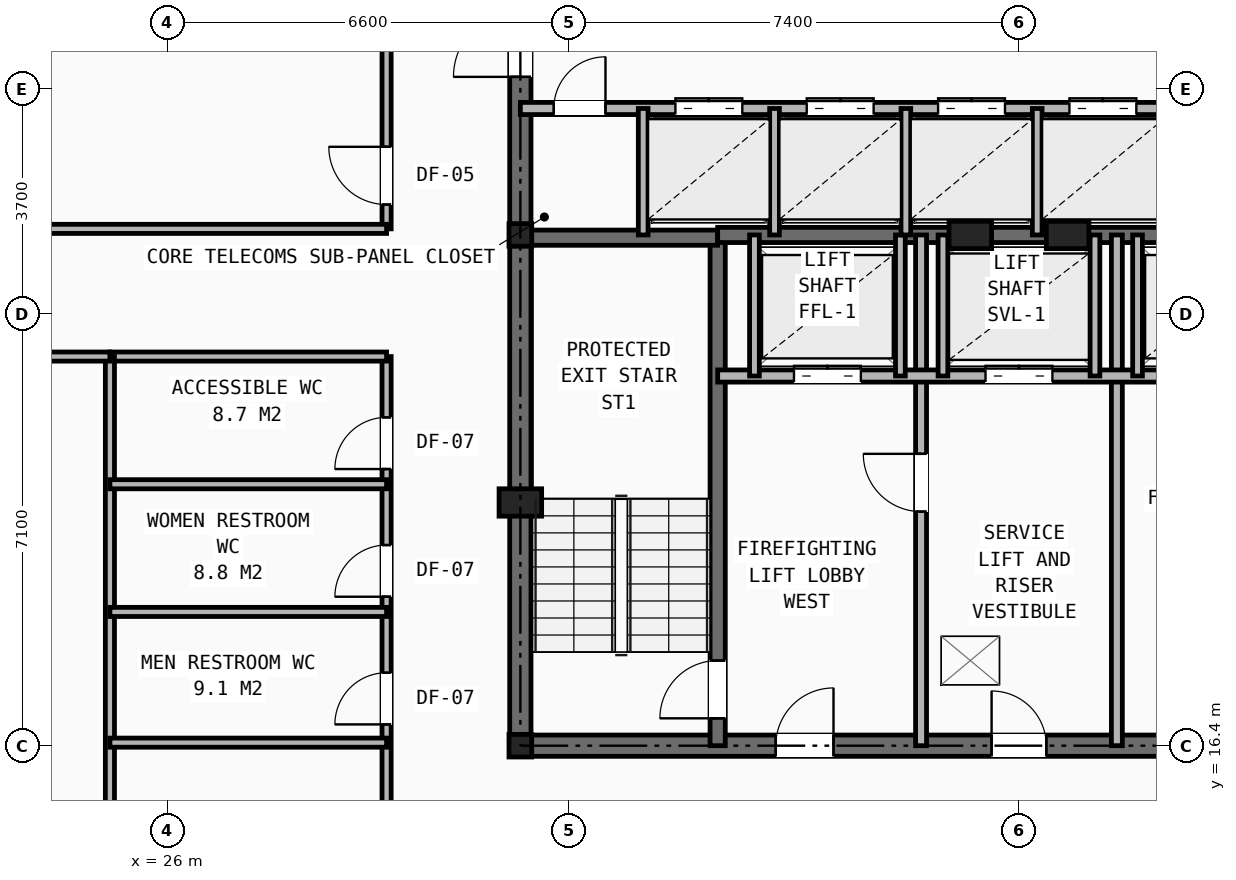
"""IFC4 building model, lengths in metres.
Left out: names, types, materials, properties, quantities, classifications, styles, units other than length and angle.
Written with IfcOpenShell. Run it as: python <this file> out.ifc"""

import sys

from ifc_helpers import new_model, si_unit, direction, frame, frame_2d, origin, origin_2d, place, context, subcontext, project, spatial, rectangle, i_section, extrude, element, fill, save


model = new_model("IFC4")
c1 = context("Model", 3, precision=1e-05, world=origin(), true_north=direction((0.0, 1.0)))
c2 = subcontext(c1, "Body", "Model", "MODEL_VIEW")
j1 = project(units=[si_unit("LENGTHUNIT", "METRE"), si_unit("PLANEANGLEUNIT", "RADIAN")], contexts=[c1])
p1 = place(None, origin())
s1 = spatial("IfcSite", under=j1, at=p1, CompositionType="ELEMENT")
p2 = place(p1, origin())
s2 = spatial("IfcBuilding", under=s1, at=p2, CompositionType="ELEMENT")
p3 = place(p2, frame((0.0, 0.0, 140.15)))
s3 = spatial("IfcBuildingStorey", under=s2, at=p3, CompositionType="ELEMENT", Elevation=140.15)
for number, where, z_axis, x_axis in (
    (1, (31.8, 16.4, 0.0), (0.0, 0.0, 1.0), (1.0, 0.0, 0.0)),
    (2, (31.8, 24.8, 0.0), (0.0, 0.0, 1.0), (1.0, 0.0, 0.0)),
):
    element("IfcColumn", number, at=place(p3, frame(where, z_axis=z_axis, x_axis=x_axis)), inside=s3, PredefinedType="COLUMN", context=c2, shape_type="SweptSolid", body=[
        extrude(i_section(OverallWidth=0.374, OverallDepth=0.372, WebThickness=0.016, FlangeThickness=0.026, at=origin_2d()), origin(), (0.0, 0.0, 1.0), 3.45),
    ])
for number, where, z_axis, x_axis in (
    (3, (31.8, 20.4, 0.0), (0.0, 0.0, 1.0), (1.0, 0.0, 0.0)),
    (4, (39.2, 24.8, 0.0), (0.0, 0.0, 1.0), (1.0, 0.0, 0.0)),
    (5, (40.8, 24.8, 0.0), (0.0, 0.0, 1.0), (1.0, 0.0, 0.0)),
):
    element("IfcColumn", number, at=place(p3, frame(where, z_axis=z_axis, x_axis=x_axis)), inside=s3, PredefinedType="PILASTER", context=c2, shape_type="SweptSolid", body=[
        extrude(rectangle(XDim=0.7, YDim=0.45, at=origin_2d()), origin(), (0.0, 0.0, 1.0), 3.45),
    ])
p4 = place(p3, frame((31.8, 16.4, 0.0), z_axis=(0.0, 0.0, 1.0), x_axis=(1.0, 0.0, 0.0)))
e6 = element("IfcWall", 6, at=p4, inside=s3, PredefinedType="SHEAR", context=c2, shape_type="SweptSolid", body=[
    extrude(rectangle(XDim=16.4, YDim=0.35, at=frame_2d((8.2, 0.0))), origin(), (0.0, 0.0, 1.0), 3.21),
])
p5 = place(p4, frame((7.75, 0.0, 0.0)))
e7 = element("IfcOpeningElement", 7, at=p5, cuts=e6, PredefinedType="OPENING", context=c2, shape_type="SweptSolid", body=[
    extrude(rectangle(XDim=0.9, YDim=2.1, at=frame_2d((0.45, 1.05))), frame((0.0, 0.185, 0.0), z_axis=(0.0, -1.0, 0.0), x_axis=(1.0, 0.0, 0.0)), (0.0, 0.0, 1.0), 0.37),
])
p6 = place(p4, frame((4.2, 0.0, 0.0)))
e8 = element("IfcOpeningElement", 8, at=p6, cuts=e6, PredefinedType="OPENING", context=c2, shape_type="SweptSolid", body=[
    extrude(rectangle(XDim=0.95, YDim=2.1, at=frame_2d((0.475, 1.05))), frame((0.0, 0.185, 0.0), z_axis=(0.0, -1.0, 0.0), x_axis=(1.0, 0.0, 0.0)), (0.0, 0.0, 1.0), 0.37),
])
p7 = place(p4, frame((10.6, 0.0, 0.0)))
e9 = element("IfcOpeningElement", 9, at=p7, cuts=e6, PredefinedType="OPENING", context=c2, shape_type="SweptSolid", body=[
    extrude(rectangle(XDim=0.95, YDim=2.1, at=frame_2d((0.475, 1.05))), frame((0.0, 0.185, 0.0), z_axis=(0.0, -1.0, 0.0), x_axis=(1.0, 0.0, 0.0)), (0.0, 0.0, 1.0), 0.37),
])
p8 = place(p3, frame((31.8, 16.4, 0.0), z_axis=(0.0, 0.0, 1.0), x_axis=(0.0, 1.0, 0.0)))
e10 = element("IfcWall", 10, at=p8, inside=s3, PredefinedType="SHEAR", context=c2, shape_type="SweptSolid", body=[
    extrude(rectangle(XDim=14.8, YDim=0.35, at=frame_2d((7.4, 0.0))), origin(), (0.0, 0.0, 1.0), 3.21),
])
p9 = place(p8, frame((11.0, 0.0, 0.0)))
e11 = element("IfcOpeningElement", 11, at=p9, cuts=e10, PredefinedType="OPENING", context=c2, shape_type="SweptSolid", body=[
    extrude(rectangle(XDim=1.1, YDim=2.15, at=frame_2d((0.55, 1.075))), frame((0.0, 0.185, 0.0), z_axis=(0.0, -1.0, 0.0), x_axis=(1.0, 0.0, 0.0)), (0.0, 0.0, 1.0), 0.37),
])
p10 = place(p3, frame((35.045, 16.4, 0.0), z_axis=(0.0, 0.0, 1.0), x_axis=(0.0, 1.0, 0.0)))
e12 = element("IfcWall", 12, at=p10, inside=s3, PredefinedType="SHEAR", context=c2, shape_type="SweptSolid", body=[
    extrude(rectangle(XDim=8.4, YDim=0.25, at=frame_2d((4.2, 0.0))), origin(), (0.0, 0.0, 1.0), 3.21),
])
p11 = place(p10, frame((0.45, 0.0, 0.0)))
e13 = element("IfcOpeningElement", 13, at=p11, cuts=e12, PredefinedType="OPENING", context=c2, shape_type="SweptSolid", body=[
    extrude(rectangle(XDim=0.95, YDim=2.1, at=frame_2d((0.475, 1.05))), frame((0.0, 0.135, 0.0), z_axis=(0.0, -1.0, 0.0), x_axis=(1.0, 0.0, 0.0)), (0.0, 0.0, 1.0), 0.27),
])
p12 = place(p3, frame((31.8, 24.755, 0.0), z_axis=(0.0, 0.0, 1.0), x_axis=(1.0, 0.0, 0.0)))
e14 = element("IfcWall", 14, at=p12, inside=s3, PredefinedType="SHEAR", context=c2, shape_type="SweptSolid", body=[
    extrude(rectangle(XDim=3.245, YDim=0.25, at=frame_2d((1.623, 0.0))), origin(), (0.0, 0.0, 1.0), 3.21),
])
p13 = place(p3, frame((35.045, 24.8, 0.0), z_axis=(0.0, 0.0, 1.0), x_axis=(1.0, 0.0, 0.0)))
e15 = element("IfcWall", 15, at=p13, inside=s3, PredefinedType="SHEAR", context=c2, shape_type="SweptSolid", body=[
    extrude(rectangle(XDim=9.91, YDim=0.25, at=frame_2d((4.955, 0.0))), origin(), (0.0, 0.0, 1.0), 3.21),
])
p14 = place(p3, frame((38.39, 16.4, 0.0), z_axis=(0.0, 0.0, 1.0), x_axis=(0.0, 1.0, 0.0)))
e16 = element("IfcWall", 16, at=p14, inside=s3, PredefinedType="PARTITIONING", context=c2, shape_type="SweptSolid", body=[
    extrude(rectangle(XDim=8.4, YDim=0.18, at=frame_2d((4.2, 0.0))), origin(), (0.0, 0.0, 1.0), 2.938),
])
p15 = place(p14, frame((3.85, 0.0, 0.0)))
e17 = element("IfcOpeningElement", 17, at=p15, cuts=e16, PredefinedType="OPENING", context=c2, shape_type="SweptSolid", body=[
    extrude(rectangle(XDim=0.95, YDim=2.1, at=frame_2d((0.475, 1.05))), frame((0.0, 0.1, 0.0), z_axis=(0.0, -1.0, 0.0), x_axis=(1.0, 0.0, 0.0)), (0.0, 0.0, 1.0), 0.2),
])
p16 = place(p3, frame((41.61, 16.4, 0.0), z_axis=(0.0, 0.0, 1.0), x_axis=(0.0, 1.0, 0.0)))
e18 = element("IfcWall", 18, at=p16, inside=s3, PredefinedType="PARTITIONING", context=c2, shape_type="SweptSolid", body=[
    extrude(rectangle(XDim=8.4, YDim=0.18, at=frame_2d((4.2, 0.0))), origin(), (0.0, 0.0, 1.0), 2.938),
])
p17 = place(p3, frame((35.045, 22.48, 0.0), z_axis=(0.0, 0.0, 1.0), x_axis=(1.0, 0.0, 0.0)))
e19 = element("IfcWall", 19, at=p17, inside=s3, PredefinedType="SOLIDWALL", context=c2, shape_type="SweptSolid", body=[
    extrude(rectangle(XDim=9.91, YDim=0.2, at=frame_2d((4.955, 0.0))), origin(), (0.0, 0.0, 1.0), 3.21),
])
p18 = place(p17, frame((1.255, 0.0, 0.0)))
e20 = element("IfcOpeningElement", 20, at=p18, cuts=e19, PredefinedType="OPENING", context=c2, shape_type="SweptSolid", body=[
    extrude(rectangle(XDim=1.1, YDim=2.15, at=frame_2d((0.55, 1.075))), frame((0.0, 0.11, 0.0), z_axis=(0.0, -1.0, 0.0), x_axis=(1.0, 0.0, 0.0)), (0.0, 0.0, 1.0), 0.22),
])
p19 = place(p17, frame((7.555, 0.0, 0.0)))
e21 = element("IfcOpeningElement", 21, at=p19, cuts=e19, PredefinedType="OPENING", context=c2, shape_type="SweptSolid", body=[
    extrude(rectangle(XDim=1.1, YDim=2.15, at=frame_2d((0.55, 1.075))), frame((0.0, 0.11, 0.0), z_axis=(0.0, -1.0, 0.0), x_axis=(1.0, 0.0, 0.0)), (0.0, 0.0, 1.0), 0.22),
])
p20 = place(p17, frame((4.405, 0.0, 0.0)))
e22 = element("IfcOpeningElement", 22, at=p20, cuts=e19, PredefinedType="OPENING", context=c2, shape_type="SweptSolid", body=[
    extrude(rectangle(XDim=1.1, YDim=2.15, at=frame_2d((0.55, 1.075))), frame((0.0, 0.11, 0.0), z_axis=(0.0, -1.0, 0.0), x_axis=(1.0, 0.0, 0.0)), (0.0, 0.0, 1.0), 0.22),
])
for number, where, z_axis, x_axis in (
    (23, (35.65, 22.48, 0.0), (0.0, 0.0, 1.0), (0.0, 1.0, 0.0)),
    (24, (38.05, 22.48, 0.0), (0.0, 0.0, 1.0), (0.0, 1.0, 0.0)),
    (25, (41.95, 22.48, 0.0), (0.0, 0.0, 1.0), (0.0, 1.0, 0.0)),
    (26, (38.75, 22.48, 0.0), (0.0, 0.0, 1.0), (0.0, 1.0, 0.0)),
    (27, (41.25, 22.48, 0.0), (0.0, 0.0, 1.0), (0.0, 1.0, 0.0)),
):
    element("IfcWall", number, at=place(p3, frame(where, z_axis=z_axis, x_axis=x_axis)), inside=s3, PredefinedType="SOLIDWALL", context=c2, shape_type="SweptSolid", body=[
        extrude(rectangle(XDim=2.32, YDim=0.16, at=frame_2d((1.16, 0.0))), origin(), (0.0, 0.0, 1.0), 3.21),
    ])
p21 = place(p3, frame((31.8, 26.88, 0.0), z_axis=(0.0, 0.0, 1.0), x_axis=(1.0, 0.0, 0.0)))
e28 = element("IfcWall", 28, at=p21, inside=s3, PredefinedType="SOLIDWALL", context=c2, shape_type="SweptSolid", body=[
    extrude(rectangle(XDim=16.4, YDim=0.2, at=frame_2d((8.2, 0.0))), origin(), (0.0, 0.0, 1.0), 2.661),
])
p22 = place(p21, frame((0.55, 0.0, 0.0)))
e29 = element("IfcOpeningElement", 29, at=p22, cuts=e28, PredefinedType="OPENING", context=c2, shape_type="SweptSolid", body=[
    extrude(rectangle(XDim=0.85, YDim=2.05, at=frame_2d((0.425, 1.025))), frame((0.0, 0.11, 0.0), z_axis=(0.0, -1.0, 0.0), x_axis=(1.0, 0.0, 0.0)), (0.0, 0.0, 1.0), 0.22),
])
p23 = place(p21, frame((2.55, 0.0, 0.0)))
e30 = element("IfcOpeningElement", 30, at=p23, cuts=e28, PredefinedType="OPENING", context=c2, shape_type="SweptSolid", body=[
    extrude(rectangle(XDim=1.1, YDim=2.15, at=frame_2d((0.55, 1.075))), frame((0.0, 0.11, 0.0), z_axis=(0.0, -1.0, 0.0), x_axis=(1.0, 0.0, 0.0)), (0.0, 0.0, 1.0), 0.22),
])
p24 = place(p21, frame((4.71, 0.0, 0.0)))
e31 = element("IfcOpeningElement", 31, at=p24, cuts=e28, PredefinedType="OPENING", context=c2, shape_type="SweptSolid", body=[
    extrude(rectangle(XDim=1.1, YDim=2.15, at=frame_2d((0.55, 1.075))), frame((0.0, 0.11, 0.0), z_axis=(0.0, -1.0, 0.0), x_axis=(1.0, 0.0, 0.0)), (0.0, 0.0, 1.0), 0.22),
])
p25 = place(p21, frame((6.87, 0.0, 0.0)))
e32 = element("IfcOpeningElement", 32, at=p25, cuts=e28, PredefinedType="OPENING", context=c2, shape_type="SweptSolid", body=[
    extrude(rectangle(XDim=1.1, YDim=2.15, at=frame_2d((0.55, 1.075))), frame((0.0, 0.11, 0.0), z_axis=(0.0, -1.0, 0.0), x_axis=(1.0, 0.0, 0.0)), (0.0, 0.0, 1.0), 0.22),
])
p26 = place(p21, frame((9.03, 0.0, 0.0)))
e33 = element("IfcOpeningElement", 33, at=p26, cuts=e28, PredefinedType="OPENING", context=c2, shape_type="SweptSolid", body=[
    extrude(rectangle(XDim=1.1, YDim=2.15, at=frame_2d((0.55, 1.075))), frame((0.0, 0.11, 0.0), z_axis=(0.0, -1.0, 0.0), x_axis=(1.0, 0.0, 0.0)), (0.0, 0.0, 1.0), 0.22),
])
for number, where, z_axis, x_axis in (
    (34, (33.82, 24.8, 0.0), (0.0, 0.0, 1.0), (0.0, 1.0, 0.0)),
    (35, (35.98, 24.8, 0.0), (0.0, 0.0, 1.0), (0.0, 1.0, 0.0)),
    (36, (38.14, 24.8, 0.0), (0.0, 0.0, 1.0), (0.0, 1.0, 0.0)),
    (37, (40.3, 24.8, 0.0), (0.0, 0.0, 1.0), (0.0, 1.0, 0.0)),
):
    element("IfcWall", number, at=place(p3, frame(where, z_axis=z_axis, x_axis=x_axis)), inside=s3, PredefinedType="SOLIDWALL", context=c2, shape_type="SweptSolid", body=[
        extrude(rectangle(XDim=2.08, YDim=0.16, at=frame_2d((1.04, 0.0))), origin(), (0.0, 0.0, 1.0), 3.21),
    ])
p27 = place(p3, frame((29.6, 14.1, 0.0), z_axis=(0.0, 0.0, 1.0), x_axis=(0.0, 1.0, 0.0)))
e38 = element("IfcWall", 38, at=p27, inside=s3, PredefinedType="PARTITIONING", context=c2, shape_type="SweptSolid", body=[
    extrude(rectangle(XDim=8.7, YDim=0.15, at=frame_2d((4.35, 0.0))), origin(), (0.0, 0.0, 1.0), 3.21),
])
p28 = place(p27, frame((2.65, 0.0, 0.0)))
e39 = element("IfcOpeningElement", 39, at=p28, cuts=e38, PredefinedType="OPENING", context=c2, shape_type="SweptSolid", body=[
    extrude(rectangle(XDim=0.85, YDim=2.05, at=frame_2d((0.425, 1.025))), frame((0.0, 0.085, 0.0), z_axis=(0.0, -1.0, 0.0), x_axis=(1.0, 0.0, 0.0)), (0.0, 0.0, 1.0), 0.17),
])
p29 = place(p27, frame((4.75, 0.0, 0.0)))
e40 = element("IfcOpeningElement", 40, at=p29, cuts=e38, PredefinedType="OPENING", context=c2, shape_type="SweptSolid", body=[
    extrude(rectangle(XDim=0.85, YDim=2.05, at=frame_2d((0.425, 1.025))), frame((0.0, 0.085, 0.0), z_axis=(0.0, -1.0, 0.0), x_axis=(1.0, 0.0, 0.0)), (0.0, 0.0, 1.0), 0.17),
])
p30 = place(p27, frame((6.85, 0.0, 0.0)))
e41 = element("IfcOpeningElement", 41, at=p30, cuts=e38, PredefinedType="OPENING", context=c2, shape_type="SweptSolid", body=[
    extrude(rectangle(XDim=0.85, YDim=2.05, at=frame_2d((0.425, 1.025))), frame((0.0, 0.085, 0.0), z_axis=(0.0, -1.0, 0.0), x_axis=(1.0, 0.0, 0.0)), (0.0, 0.0, 1.0), 0.17),
])
p31 = place(p3, frame((29.6, 24.9, 0.0), z_axis=(0.0, 0.0, 1.0), x_axis=(0.0, 1.0, 0.0)))
e42 = element("IfcWall", 42, at=p31, inside=s3, PredefinedType="PARTITIONING", context=c2, shape_type="SweptSolid", body=[
    extrude(rectangle(XDim=13.9, YDim=0.15, at=frame_2d((6.95, 0.0))), origin(), (0.0, 0.0, 1.0), 2.252),
])
p32 = place(p31, frame((0.4, 0.0, 0.0)))
e43 = element("IfcOpeningElement", 43, at=p32, cuts=e42, PredefinedType="OPENING", context=c2, shape_type="SweptSolid", body=[
    extrude(rectangle(XDim=0.95, YDim=2.1, at=frame_2d((0.475, 1.05))), frame((0.0, 0.085, 0.0), z_axis=(0.0, -1.0, 0.0), x_axis=(1.0, 0.0, 0.0)), (0.0, 0.0, 1.0), 0.17),
])
p33 = place(p31, frame((8.5, 0.0, 0.0)))
e44 = element("IfcOpeningElement", 44, at=p33, cuts=e42, PredefinedType="OPENING", context=c2, shape_type="SweptSolid", body=[
    extrude(rectangle(XDim=0.95, YDim=2.1, at=frame_2d((0.475, 1.05))), frame((0.0, 0.085, 0.0), z_axis=(0.0, -1.0, 0.0), x_axis=(1.0, 0.0, 0.0)), (0.0, 0.0, 1.0), 0.17),
])
p34 = place(p3, frame((25.05, 22.8, 0.0), z_axis=(0.0, 0.0, 1.0), x_axis=(1.0, 0.0, 0.0)))
e45 = element("IfcWall", 45, at=p34, inside=s3, PredefinedType="PARTITIONING", context=c2, shape_type="SweptSolid", body=[
    extrude(rectangle(XDim=4.55, YDim=0.15, at=frame_2d((2.275, 0.0))), origin(), (0.0, 0.0, 1.0), 3.21),
])
p35 = place(p3, frame((19.703, 24.9, 0.0), z_axis=(0.0, 0.0, 1.0), x_axis=(1.0, 0.0, 0.0)))
e46 = element("IfcWall", 46, at=p35, inside=s3, PredefinedType="PARTITIONING", context=c2, shape_type="SweptSolid", body=[
    extrude(rectangle(XDim=9.897, YDim=0.15, at=frame_2d((4.948, 0.0))), origin(), (0.0, 0.0, 1.0), 2.589),
])
p36 = place(p3, frame((25.05, 14.1, 0.0), z_axis=(0.0, 0.0, 1.0), x_axis=(0.0, 1.0, 0.0)))
e47 = element("IfcWall", 47, at=p36, inside=s3, PredefinedType="PARTITIONING", context=c2, shape_type="SweptSolid", body=[
    extrude(rectangle(XDim=8.7, YDim=0.15, at=frame_2d((4.35, 0.0))), origin(), (0.0, 0.0, 1.0), 3.21),
])
for number, where, z_axis, x_axis in (
    (48, (25.05, 16.45, 0.0), (0.0, 0.0, 1.0), (1.0, 0.0, 0.0)),
    (49, (25.05, 18.6, 0.0), (0.0, 0.0, 1.0), (1.0, 0.0, 0.0)),
    (50, (25.05, 20.7, 0.0), (0.0, 0.0, 1.0), (1.0, 0.0, 0.0)),
):
    element("IfcWall", number, at=place(p3, frame(where, z_axis=z_axis, x_axis=x_axis)), inside=s3, PredefinedType="PARTITIONING", context=c2, shape_type="SweptSolid", body=[
        extrude(rectangle(XDim=4.55, YDim=0.15, at=frame_2d((2.275, 0.0))), origin(), (0.0, 0.0, 1.0), 3.21),
    ])
p37 = place(p3, frame((20.5, 22.8, 0.0), z_axis=(0.0, 0.0, 1.0), x_axis=(1.0, 0.0, 0.0)))
e51 = element("IfcWall", 51, at=p37, inside=s3, PredefinedType="PARTITIONING", context=c2, shape_type="SweptSolid", body=[
    extrude(rectangle(XDim=4.55, YDim=0.15, at=frame_2d((2.275, 0.0))), origin(), (0.0, 0.0, 1.0), 3.21),
])
p38 = place(p37, frame((1.4, 0.0, 0.0)))
e52 = element("IfcOpeningElement", 52, at=p38, cuts=e51, PredefinedType="OPENING", context=c2, shape_type="SweptSolid", body=[
    extrude(rectangle(XDim=0.95, YDim=2.1, at=frame_2d((0.475, 1.05))), frame((0.0, 0.085, 0.0), z_axis=(0.0, -1.0, 0.0), x_axis=(1.0, 0.0, 0.0)), (0.0, 0.0, 1.0), 0.17),
])
p39 = place(p5, origin())
e53 = element("IfcDoor", 53, at=p39, inside=s3, OperationType="SINGLE_SWING_LEFT", PredefinedType="DOOR", context=c2, shape_type="SweptSolid", body=[
    extrude(rectangle(XDim=0.9, YDim=2.1, at=frame_2d((0.45, 1.05))), frame((0.0, 0.025, 0.0), z_axis=(0.0, -1.0, 0.0), x_axis=(1.0, 0.0, 0.0)), (0.0, 0.0, 1.0), 0.05),
])
fill(e7, e53)
p40 = place(p15, origin())
e54 = element("IfcDoor", 54, at=p40, inside=s3, OperationType="SINGLE_SWING_RIGHT", PredefinedType="DOOR", context=c2, shape_type="SweptSolid", body=[
    extrude(rectangle(XDim=0.95, YDim=2.1, at=frame_2d((0.475, 1.05))), frame((0.0, 0.025, 0.0), z_axis=(0.0, -1.0, 0.0), x_axis=(1.0, 0.0, 0.0)), (0.0, 0.0, 1.0), 0.05),
])
fill(e17, e54)
p41 = place(p11, origin())
e55 = element("IfcDoor", 55, at=p41, inside=s3, OperationType="SINGLE_SWING_LEFT", PredefinedType="DOOR", context=c2, shape_type="SweptSolid", body=[
    extrude(rectangle(XDim=0.95, YDim=2.1, at=frame_2d((0.475, 1.05))), frame((0.0, 0.025, 0.0), z_axis=(0.0, -1.0, 0.0), x_axis=(1.0, 0.0, 0.0)), (0.0, 0.0, 1.0), 0.05),
])
fill(e13, e55)
p42 = place(p6, origin())
e56 = element("IfcDoor", 56, at=p42, inside=s3, OperationType="SINGLE_SWING_RIGHT", PredefinedType="DOOR", context=c2, shape_type="SweptSolid", body=[
    extrude(rectangle(XDim=0.95, YDim=2.1, at=frame_2d((0.475, 1.05))), frame((0.0, 0.025, 0.0), z_axis=(0.0, -1.0, 0.0), x_axis=(1.0, 0.0, 0.0)), (0.0, 0.0, 1.0), 0.05),
])
fill(e8, e56)
p43 = place(p18, origin())
e57 = element("IfcDoor", 57, at=p43, inside=s3, OperationType="DOUBLE_DOOR_SLIDING", PredefinedType="DOOR", context=c2, shape_type="SweptSolid", body=[
    extrude(rectangle(XDim=1.1, YDim=2.15, at=frame_2d((0.55, 1.075))), frame((0.0, 0.025, 0.0), z_axis=(0.0, -1.0, 0.0), x_axis=(1.0, 0.0, 0.0)), (0.0, 0.0, 1.0), 0.05),
])
fill(e20, e57)
p44 = place(p20, origin())
e58 = element("IfcDoor", 58, at=p44, inside=s3, OperationType="DOUBLE_DOOR_SLIDING", PredefinedType="DOOR", context=c2, shape_type="SweptSolid", body=[
    extrude(rectangle(XDim=1.1, YDim=2.15, at=frame_2d((0.55, 1.075))), frame((0.0, 0.025, 0.0), z_axis=(0.0, -1.0, 0.0), x_axis=(1.0, 0.0, 0.0)), (0.0, 0.0, 1.0), 0.05),
])
fill(e22, e58)
p45 = place(p22, origin())
e59 = element("IfcDoor", 59, at=p45, inside=s3, OperationType="SINGLE_SWING_RIGHT", PredefinedType="DOOR", context=c2, shape_type="SweptSolid", body=[
    extrude(rectangle(XDim=0.85, YDim=2.05, at=frame_2d((0.425, 1.025))), frame((0.0, 0.025, 0.0), z_axis=(0.0, -1.0, 0.0), x_axis=(1.0, 0.0, 0.0)), (0.0, 0.0, 1.0), 0.05),
])
fill(e29, e59)
p46 = place(p9, origin())
e60 = element("IfcDoor", 60, at=p46, inside=s3, OperationType="SINGLE_SWING_LEFT", PredefinedType="DOOR", context=c2, shape_type="SweptSolid", body=[
    extrude(rectangle(XDim=1.1, YDim=2.15, at=frame_2d((0.55, 1.075))), frame((0.0, 0.025, 0.0), z_axis=(0.0, -1.0, 0.0), x_axis=(1.0, 0.0, 0.0)), (0.0, 0.0, 1.0), 0.05),
])
fill(e11, e60)
p47 = place(p23, origin())
e61 = element("IfcDoor", 61, at=p47, inside=s3, OperationType="DOUBLE_DOOR_SLIDING", PredefinedType="DOOR", context=c2, shape_type="SweptSolid", body=[
    extrude(rectangle(XDim=1.1, YDim=2.15, at=frame_2d((0.55, 1.075))), frame((0.0, 0.025, 0.0), z_axis=(0.0, -1.0, 0.0), x_axis=(1.0, 0.0, 0.0)), (0.0, 0.0, 1.0), 0.05),
])
fill(e30, e61)
p48 = place(p24, origin())
e62 = element("IfcDoor", 62, at=p48, inside=s3, OperationType="DOUBLE_DOOR_SLIDING", PredefinedType="DOOR", context=c2, shape_type="SweptSolid", body=[
    extrude(rectangle(XDim=1.1, YDim=2.15, at=frame_2d((0.55, 1.075))), frame((0.0, 0.025, 0.0), z_axis=(0.0, -1.0, 0.0), x_axis=(1.0, 0.0, 0.0)), (0.0, 0.0, 1.0), 0.05),
])
fill(e31, e62)
p49 = place(p25, origin())
e63 = element("IfcDoor", 63, at=p49, inside=s3, OperationType="DOUBLE_DOOR_SLIDING", PredefinedType="DOOR", context=c2, shape_type="SweptSolid", body=[
    extrude(rectangle(XDim=1.1, YDim=2.15, at=frame_2d((0.55, 1.075))), frame((0.0, 0.025, 0.0), z_axis=(0.0, -1.0, 0.0), x_axis=(1.0, 0.0, 0.0)), (0.0, 0.0, 1.0), 0.05),
])
fill(e32, e63)
p50 = place(p26, origin())
e64 = element("IfcDoor", 64, at=p50, inside=s3, OperationType="DOUBLE_DOOR_SLIDING", PredefinedType="DOOR", context=c2, shape_type="SweptSolid", body=[
    extrude(rectangle(XDim=1.1, YDim=2.15, at=frame_2d((0.55, 1.075))), frame((0.0, 0.025, 0.0), z_axis=(0.0, -1.0, 0.0), x_axis=(1.0, 0.0, 0.0)), (0.0, 0.0, 1.0), 0.05),
])
fill(e33, e64)
p51 = place(p28, origin())
e65 = element("IfcDoor", 65, at=p51, inside=s3, OperationType="SINGLE_SWING_LEFT", PredefinedType="DOOR", context=c2, shape_type="SweptSolid", body=[
    extrude(rectangle(XDim=0.85, YDim=2.05, at=frame_2d((0.425, 1.025))), frame((0.0, 0.025, 0.0), z_axis=(0.0, -1.0, 0.0), x_axis=(1.0, 0.0, 0.0)), (0.0, 0.0, 1.0), 0.05),
])
fill(e39, e65)
p52 = place(p29, origin())
e66 = element("IfcDoor", 66, at=p52, inside=s3, OperationType="SINGLE_SWING_LEFT", PredefinedType="DOOR", context=c2, shape_type="SweptSolid", body=[
    extrude(rectangle(XDim=0.85, YDim=2.05, at=frame_2d((0.425, 1.025))), frame((0.0, 0.025, 0.0), z_axis=(0.0, -1.0, 0.0), x_axis=(1.0, 0.0, 0.0)), (0.0, 0.0, 1.0), 0.05),
])
fill(e40, e66)
p53 = place(p30, origin())
e67 = element("IfcDoor", 67, at=p53, inside=s3, OperationType="SINGLE_SWING_LEFT", PredefinedType="DOOR", context=c2, shape_type="SweptSolid", body=[
    extrude(rectangle(XDim=0.85, YDim=2.05, at=frame_2d((0.425, 1.025))), frame((0.0, 0.025, 0.0), z_axis=(0.0, -1.0, 0.0), x_axis=(1.0, 0.0, 0.0)), (0.0, 0.0, 1.0), 0.05),
])
fill(e41, e67)
p54 = place(p32, origin())
e68 = element("IfcDoor", 68, at=p54, inside=s3, OperationType="SINGLE_SWING_RIGHT", PredefinedType="DOOR", context=c2, shape_type="SweptSolid", body=[
    extrude(rectangle(XDim=0.95, YDim=2.1, at=frame_2d((0.475, 1.05))), frame((0.0, 0.025, 0.0), z_axis=(0.0, -1.0, 0.0), x_axis=(1.0, 0.0, 0.0)), (0.0, 0.0, 1.0), 0.05),
])
fill(e43, e68)
save(model, sys.argv[1])
